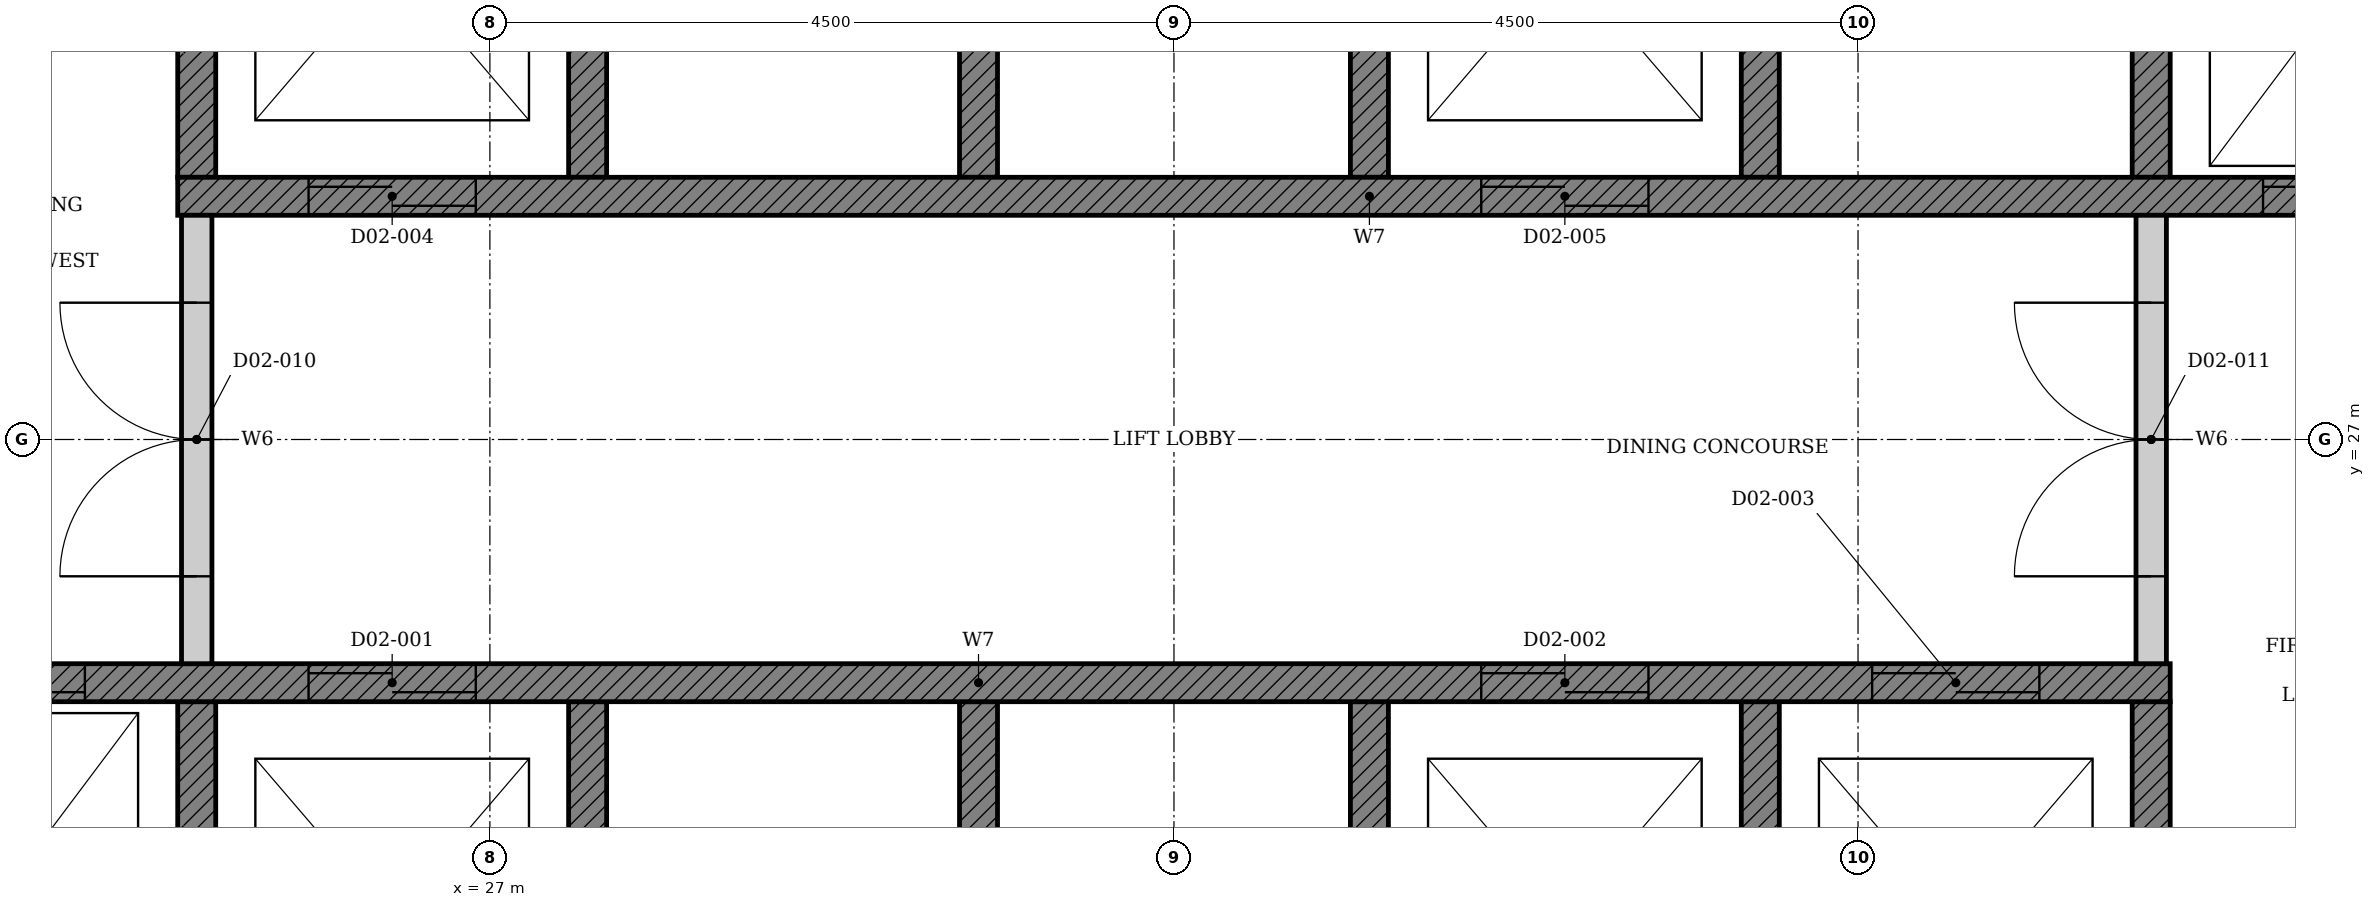
"""IFC4 building model, lengths in metres.
Left out: names, types, materials, properties, quantities, classifications, styles, units other than length and angle.
Written with IfcOpenShell. Run it as: python <this file> out.ifc"""

import sys

from ifc_helpers import new_model, si_unit, direction, frame, frame_2d, origin, place, context, subcontext, project, spatial, polyline, rectangle, outline, extrude, element, fill, save


model = new_model("IFC4")
c1 = context("Model", 3, precision=1e-05, world=origin(), true_north=direction((0.0, 1.0)))
c2 = subcontext(c1, "Body", "Model", "MODEL_VIEW")
j1 = project(units=[si_unit("LENGTHUNIT", "METRE"), si_unit("PLANEANGLEUNIT", "RADIAN")], contexts=[c1])
p1 = place(None, origin())
s1 = spatial("IfcSite", under=j1, at=p1, CompositionType="ELEMENT")
p2 = place(p1, origin())
s2 = spatial("IfcBuilding", under=s1, at=p2, CompositionType="ELEMENT")
p3 = place(p2, frame((0.0, 0.0, 12.0)))
s3 = spatial("IfcBuildingStorey", under=s2, at=p3, CompositionType="ELEMENT", Elevation=12.0)
p4 = place(p3, origin())
e1 = element("IfcWall", 1, at=p4, inside=s3, PredefinedType="SHEAR", context=c2, shape_type="SweptSolid", body=[
    extrude(outline(polyline([(22.375, 22.35), (38.053, 22.35), (38.053, 25.275), (37.803, 25.275), (37.803, 22.65), (35.482, 22.65), (35.482, 25.275), (35.232, 25.275), (35.232, 22.65), (32.911, 22.65), (32.911, 25.275), (32.661, 25.275), (32.661, 22.65), (30.339, 22.65), (30.339, 25.275), (30.089, 25.275), (30.089, 22.65), (27.768, 22.65), (27.768, 25.275), (27.518, 25.275), (27.518, 22.65), (25.197, 22.65), (25.197, 25.275), (24.947, 25.275), (24.947, 22.65), (22.625, 22.65), (22.625, 25.275), (22.375, 25.275), (22.375, 22.35)])), origin(), (0.0, 0.0, 1.0), 5.05),
])
p5 = place(p3, origin())
e2 = element("IfcWall", 2, at=p5, inside=s3, PredefinedType="SHEAR", context=c2, shape_type="SweptSolid", body=[
    extrude(outline(polyline([(24.947, 28.725), (25.197, 28.725), (25.197, 31.35), (27.518, 31.35), (27.518, 28.725), (27.768, 28.725), (27.768, 31.35), (30.089, 31.35), (30.089, 28.725), (30.339, 28.725), (30.339, 31.35), (32.661, 31.35), (32.661, 28.725), (32.911, 28.725), (32.911, 31.35), (35.232, 31.35), (35.232, 28.725), (35.482, 28.725), (35.482, 31.35), (37.803, 31.35), (37.803, 28.725), (38.053, 28.725), (38.053, 31.35), (40.375, 31.35), (40.375, 28.725), (40.625, 28.725), (40.625, 31.65), (24.947, 31.65), (24.947, 28.725)])), origin(), (0.0, 0.0, 1.0), 5.05),
])
p6 = place(p3, frame((22.375, 25.4, 0.0), z_axis=(0.0, 0.0, 1.0), x_axis=(1.0, 0.0, 0.0)))
e3 = element("IfcWall", 3, at=p6, inside=s3, PredefinedType="SHEAR", context=c2, shape_type="SweptSolid", body=[
    extrude(rectangle(XDim=15.678, YDim=0.25, at=frame_2d((7.839, 0.0))), origin(), (0.0, 0.0, 1.0), 5.05),
])
p7 = place(p6, frame((3.432, 0.0, 0.0)))
e4 = element("IfcOpeningElement", 4, at=p7, cuts=e3, PredefinedType="OPENING", context=c2, shape_type="SweptSolid", body=[
    extrude(rectangle(XDim=1.1, YDim=2.1, at=frame_2d((0.55, 1.05))), frame((0.0, 0.135, 0.0), z_axis=(0.0, -1.0, 0.0), x_axis=(1.0, 0.0, 0.0)), (0.0, 0.0, 1.0), 0.27),
])
p8 = place(p6, frame((11.146, 0.0, 0.0)))
e5 = element("IfcOpeningElement", 5, at=p8, cuts=e3, PredefinedType="OPENING", context=c2, shape_type="SweptSolid", body=[
    extrude(rectangle(XDim=1.1, YDim=2.1, at=frame_2d((0.55, 1.05))), frame((0.0, 0.135, 0.0), z_axis=(0.0, -1.0, 0.0), x_axis=(1.0, 0.0, 0.0)), (0.0, 0.0, 1.0), 0.27),
])
p9 = place(p6, frame((13.718, 0.0, 0.0)))
e6 = element("IfcOpeningElement", 6, at=p9, cuts=e3, PredefinedType="OPENING", context=c2, shape_type="SweptSolid", body=[
    extrude(rectangle(XDim=1.1, YDim=2.1, at=frame_2d((0.55, 1.05))), frame((0.0, 0.135, 0.0), z_axis=(0.0, -1.0, 0.0), x_axis=(1.0, 0.0, 0.0)), (0.0, 0.0, 1.0), 0.27),
])
p10 = place(p6, frame((0.861, 0.0, 0.0)))
e7 = element("IfcOpeningElement", 7, at=p10, cuts=e3, PredefinedType="OPENING", context=c2, shape_type="SweptSolid", body=[
    extrude(rectangle(XDim=1.1, YDim=2.1, at=frame_2d((0.55, 1.05))), frame((0.0, 0.135, 0.0), z_axis=(0.0, -1.0, 0.0), x_axis=(1.0, 0.0, 0.0)), (0.0, 0.0, 1.0), 0.27),
])
p11 = place(p3, frame((24.947, 28.6, 0.0), z_axis=(0.0, 0.0, 1.0), x_axis=(1.0, 0.0, 0.0)))
e8 = element("IfcWall", 8, at=p11, inside=s3, PredefinedType="SHEAR", context=c2, shape_type="SweptSolid", body=[
    extrude(rectangle(XDim=15.678, YDim=0.25, at=frame_2d((7.839, 0.0))), origin(), (0.0, 0.0, 1.0), 5.05),
])
p12 = place(p11, frame((0.861, 0.0, 0.0)))
e9 = element("IfcOpeningElement", 9, at=p12, cuts=e8, PredefinedType="OPENING", context=c2, shape_type="SweptSolid", body=[
    extrude(rectangle(XDim=1.1, YDim=2.1, at=frame_2d((0.55, 1.05))), frame((0.0, 0.135, 0.0), z_axis=(0.0, -1.0, 0.0), x_axis=(1.0, 0.0, 0.0)), (0.0, 0.0, 1.0), 0.27),
])
p13 = place(p11, frame((8.575, 0.0, 0.0)))
e10 = element("IfcOpeningElement", 10, at=p13, cuts=e8, PredefinedType="OPENING", context=c2, shape_type="SweptSolid", body=[
    extrude(rectangle(XDim=1.1, YDim=2.1, at=frame_2d((0.55, 1.05))), frame((0.0, 0.135, 0.0), z_axis=(0.0, -1.0, 0.0), x_axis=(1.0, 0.0, 0.0)), (0.0, 0.0, 1.0), 0.27),
])
p14 = place(p11, frame((13.718, 0.0, 0.0)))
e11 = element("IfcOpeningElement", 11, at=p14, cuts=e8, PredefinedType="OPENING", context=c2, shape_type="SweptSolid", body=[
    extrude(rectangle(XDim=1.1, YDim=2.1, at=frame_2d((0.55, 1.05))), frame((0.0, 0.135, 0.0), z_axis=(0.0, -1.0, 0.0), x_axis=(1.0, 0.0, 0.0)), (0.0, 0.0, 1.0), 0.27),
])
p15 = place(p3, frame((25.072, 25.525, 0.0), z_axis=(0.0, 0.0, 1.0), x_axis=(0.0, 1.0, 0.0)))
e12 = element("IfcWall", 12, at=p15, inside=s3, PredefinedType="PARTITIONING", context=c2, shape_type="SweptSolid", body=[
    extrude(rectangle(XDim=2.95, YDim=0.2, at=frame_2d((1.475, 0.0))), origin(), (0.0, 0.0, 1.0), 5.05),
])
p16 = place(p15, frame((0.575, 0.0, 0.0)))
e13 = element("IfcOpeningElement", 13, at=p16, cuts=e12, PredefinedType="OPENING", context=c2, shape_type="SweptSolid", body=[
    extrude(rectangle(XDim=1.8, YDim=2.1, at=frame_2d((0.9, 1.05))), frame((0.0, 0.11, 0.0), z_axis=(0.0, -1.0, 0.0), x_axis=(1.0, 0.0, 0.0)), (0.0, 0.0, 1.0), 0.22),
])
p17 = place(p3, frame((37.928, 25.525, 0.0), z_axis=(0.0, 0.0, 1.0), x_axis=(0.0, 1.0, 0.0)))
e14 = element("IfcWall", 14, at=p17, inside=s3, PredefinedType="PARTITIONING", context=c2, shape_type="SweptSolid", body=[
    extrude(rectangle(XDim=2.95, YDim=0.2, at=frame_2d((1.475, 0.0))), origin(), (0.0, 0.0, 1.0), 5.05),
])
p18 = place(p17, frame((0.575, 0.0, 0.0)))
e15 = element("IfcOpeningElement", 15, at=p18, cuts=e14, PredefinedType="OPENING", context=c2, shape_type="SweptSolid", body=[
    extrude(rectangle(XDim=1.8, YDim=2.1, at=frame_2d((0.9, 1.05))), frame((0.0, 0.11, 0.0), z_axis=(0.0, -1.0, 0.0), x_axis=(1.0, 0.0, 0.0)), (0.0, 0.0, 1.0), 0.22),
])
p19 = place(p7, origin())
e16 = element("IfcDoor", 16, at=p19, inside=s3, OperationType="DOUBLE_DOOR_SLIDING", PredefinedType="DOOR", context=c2, shape_type="SweptSolid", body=[
    extrude(rectangle(XDim=1.1, YDim=2.1, at=frame_2d((0.55, 1.05))), frame((0.0, 0.025, 0.0), z_axis=(0.0, -1.0, 0.0), x_axis=(1.0, 0.0, 0.0)), (0.0, 0.0, 1.0), 0.05),
])
fill(e4, e16)
p20 = place(p8, origin())
e17 = element("IfcDoor", 17, at=p20, inside=s3, OperationType="DOUBLE_DOOR_SLIDING", PredefinedType="DOOR", context=c2, shape_type="SweptSolid", body=[
    extrude(rectangle(XDim=1.1, YDim=2.1, at=frame_2d((0.55, 1.05))), frame((0.0, 0.025, 0.0), z_axis=(0.0, -1.0, 0.0), x_axis=(1.0, 0.0, 0.0)), (0.0, 0.0, 1.0), 0.05),
])
fill(e5, e17)
p21 = place(p9, origin())
e18 = element("IfcDoor", 18, at=p21, inside=s3, OperationType="DOUBLE_DOOR_SLIDING", PredefinedType="DOOR", context=c2, shape_type="SweptSolid", body=[
    extrude(rectangle(XDim=1.1, YDim=2.1, at=frame_2d((0.55, 1.05))), frame((0.0, 0.025, 0.0), z_axis=(0.0, -1.0, 0.0), x_axis=(1.0, 0.0, 0.0)), (0.0, 0.0, 1.0), 0.05),
])
fill(e6, e18)
p22 = place(p12, origin())
e19 = element("IfcDoor", 19, at=p22, inside=s3, OperationType="DOUBLE_DOOR_SLIDING", PredefinedType="DOOR", context=c2, shape_type="SweptSolid", body=[
    extrude(rectangle(XDim=1.1, YDim=2.1, at=frame_2d((0.55, 1.05))), frame((0.0, 0.025, 0.0), z_axis=(0.0, -1.0, 0.0), x_axis=(1.0, 0.0, 0.0)), (0.0, 0.0, 1.0), 0.05),
])
fill(e9, e19)
p23 = place(p13, origin())
e20 = element("IfcDoor", 20, at=p23, inside=s3, OperationType="DOUBLE_DOOR_SLIDING", PredefinedType="DOOR", context=c2, shape_type="SweptSolid", body=[
    extrude(rectangle(XDim=1.1, YDim=2.1, at=frame_2d((0.55, 1.05))), frame((0.0, 0.025, 0.0), z_axis=(0.0, -1.0, 0.0), x_axis=(1.0, 0.0, 0.0)), (0.0, 0.0, 1.0), 0.05),
])
fill(e10, e20)
p24 = place(p10, origin())
e21 = element("IfcDoor", 21, at=p24, inside=s3, OperationType="DOUBLE_DOOR_SLIDING", PredefinedType="DOOR", context=c2, shape_type="SweptSolid", body=[
    extrude(rectangle(XDim=1.1, YDim=2.1, at=frame_2d((0.55, 1.05))), frame((0.0, 0.025, 0.0), z_axis=(0.0, -1.0, 0.0), x_axis=(1.0, 0.0, 0.0)), (0.0, 0.0, 1.0), 0.05),
])
fill(e7, e21)
p25 = place(p14, origin())
e22 = element("IfcDoor", 22, at=p25, inside=s3, OperationType="DOUBLE_DOOR_SLIDING", PredefinedType="DOOR", context=c2, shape_type="SweptSolid", body=[
    extrude(rectangle(XDim=1.1, YDim=2.1, at=frame_2d((0.55, 1.05))), frame((0.0, 0.025, 0.0), z_axis=(0.0, -1.0, 0.0), x_axis=(1.0, 0.0, 0.0)), (0.0, 0.0, 1.0), 0.05),
])
fill(e11, e22)
p26 = place(p16, origin())
e23 = element("IfcDoor", 23, at=p26, inside=s3, OperationType="DOUBLE_DOOR_SINGLE_SWING", PredefinedType="DOOR", context=c2, shape_type="SweptSolid", body=[
    extrude(rectangle(XDim=1.8, YDim=2.1, at=frame_2d((0.9, 1.05))), frame((0.0, 0.025, 0.0), z_axis=(0.0, -1.0, 0.0), x_axis=(1.0, 0.0, 0.0)), (0.0, 0.0, 1.0), 0.05),
])
fill(e13, e23)
p27 = place(p18, origin())
e24 = element("IfcDoor", 24, at=p27, inside=s3, OperationType="DOUBLE_DOOR_SINGLE_SWING", PredefinedType="DOOR", context=c2, shape_type="SweptSolid", body=[
    extrude(rectangle(XDim=1.8, YDim=2.1, at=frame_2d((0.9, 1.05))), frame((0.0, 0.025, 0.0), z_axis=(0.0, -1.0, 0.0), x_axis=(1.0, 0.0, 0.0)), (0.0, 0.0, 1.0), 0.05),
])
fill(e15, e24)
save(model, sys.argv[1])
